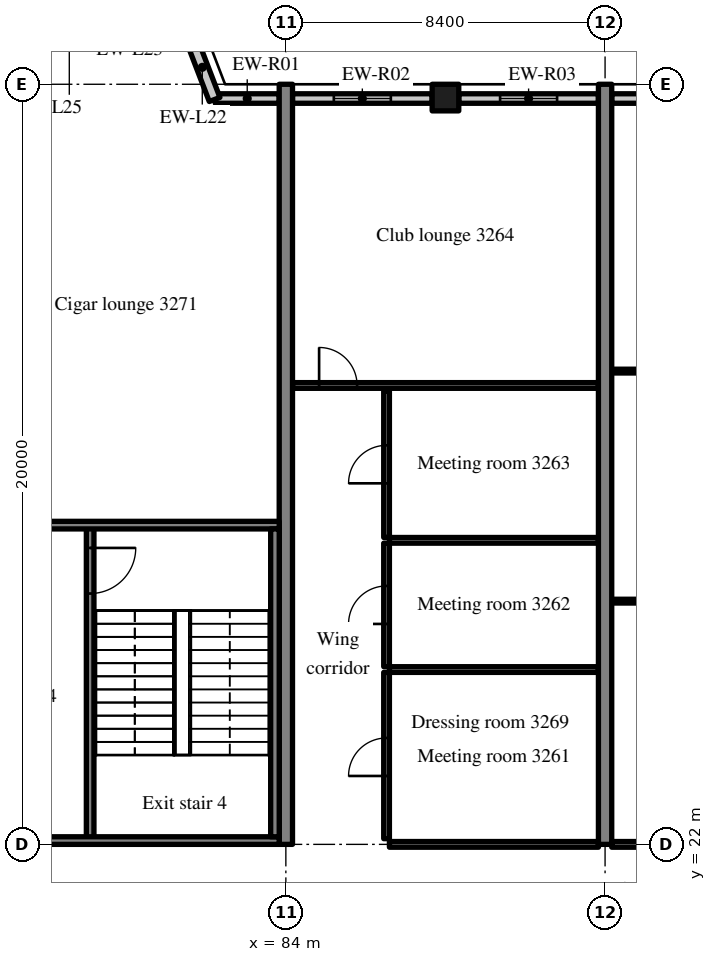
"""IFC4 building model, lengths in metres.
Left out: names, types, materials, properties, quantities, classifications, styles, units other than length and angle.
Written with IfcOpenShell. Run it as: python <this file> out.ifc"""

import sys

from ifc_helpers import new_model, si_unit, direction, frame, frame_2d, origin, origin_2d, place, context, subcontext, project, spatial, rectangle, extrude, source, transform, mapped, element, fill, save


model = new_model("IFC4")
c1 = context("Model", 3, precision=1e-05, world=origin(), true_north=direction((0.0, 1.0)))
c2 = subcontext(c1, "Body", "Model", "MODEL_VIEW")
j1 = project(units=[si_unit("LENGTHUNIT", "METRE"), si_unit("PLANEANGLEUNIT", "RADIAN")], contexts=[c1])
p1 = place(None, origin())
s1 = spatial("IfcSite", under=j1, at=p1, CompositionType="ELEMENT")
p2 = place(p1, origin())
s2 = spatial("IfcBuilding", under=s1, at=p2, CompositionType="ELEMENT")
p3 = place(p2, frame((0.0, 0.0, 133.2)))
s3 = spatial("IfcBuildingStorey", under=s2, at=p3, CompositionType="ELEMENT", Elevation=133.2)
m1 = source(origin(), c2, "Body", "SweptSolid", [
    extrude(rectangle(XDim=20.0, YDim=0.35, at=frame_2d((10.0, 0.0))), origin(), (0.0, 0.0, 1.0), 3.52),
])
for number, where, z_axis, x_axis in (
    (1, (84.0, 22.0, 0.0), (0.0, 0.0, 1.0), (0.0, 1.0, 0.0)),
    (2, (92.4, 22.0, 0.0), (0.0, 0.0, 1.0), (0.0, 1.0, 0.0)),
):
    element("IfcWall", number, at=place(p3, frame(where, z_axis=z_axis, x_axis=x_axis)), inside=s3, PredefinedType="SHEAR", context=c2, shape_type="MappedRepresentation", body=[
        mapped(m1, transform((0.0, 0.0, 0.0), scale=1.0)),
    ])
m2 = source(origin(), c2, "Body", "SweptSolid", [
    extrude(rectangle(XDim=0.7, YDim=0.7, at=origin_2d()), origin(), (0.0, 0.0, 1.0), 3.52),
])
p4 = place(p3, frame((88.2, 41.65, 0.0), z_axis=(0.0, 0.0, 1.0), x_axis=(1.0, 0.0, 0.0)))
e3 = element("IfcColumn", 3, at=p4, inside=s3, PredefinedType="COLUMN", context=c2, shape_type="MappedRepresentation", body=[
    mapped(m2, transform((0.0, 0.0, 0.0), scale=1.0)),
])
m3 = source(origin(), c2, "Body", "SweptSolid", [
    extrude(rectangle(XDim=1.683, YDim=0.25, at=frame_2d((0.841, 0.0))), origin(), (0.0, 0.0, 1.0), 2.82),
])
p5 = place(p3, frame((83.825, 41.625, 0.0), z_axis=(0.0, 0.0, 1.0), x_axis=(-1.0, 0.0, 0.0)))
e4 = element("IfcWall", 4, at=p5, inside=s3, PredefinedType="SOLIDWALL", context=c2, shape_type="MappedRepresentation", body=[
    mapped(m3, transform((0.0, 0.0, 0.0), scale=1.0)),
])
m4 = source(origin(), c2, "Body", "SweptSolid", [
    extrude(rectangle(XDim=3.675, YDim=0.25, at=frame_2d((1.837, 0.0))), origin(), (0.0, 0.0, 1.0), 2.82),
])
p6 = place(p3, frame((87.85, 41.625, 0.0), z_axis=(0.0, 0.0, 1.0), x_axis=(-1.0, 0.0, 0.0)))
e5 = element("IfcWall", 5, at=p6, inside=s3, PredefinedType="SOLIDWALL", context=c2, shape_type="MappedRepresentation", body=[
    mapped(m4, transform((0.0, 0.0, 0.0), scale=1.0)),
])
m5 = source(origin(), c2, "Body", "SweptSolid", [
    extrude(rectangle(XDim=1.5, YDim=1.5, at=frame_2d((0.75, 0.75))), frame((0.0, 0.135, 0.0), z_axis=(0.0, -1.0, 0.0), x_axis=(1.0, 0.0, 0.0)), (0.0, 0.0, 1.0), 0.27),
])
p7 = place(p6, frame((1.087, 0.0, 0.9)))
e6 = element("IfcOpeningElement", 6, at=p7, cuts=e5, PredefinedType="OPENING", context=c2, shape_type="MappedRepresentation", body=[
    mapped(m5, transform((0.0, 0.0, 0.0), scale=1.0)),
])
p8 = place(p3, frame((92.225, 41.625, 0.0), z_axis=(0.0, 0.0, 1.0), x_axis=(-1.0, 0.0, 0.0)))
e7 = element("IfcWall", 7, at=p8, inside=s3, PredefinedType="SOLIDWALL", context=c2, shape_type="MappedRepresentation", body=[
    mapped(m4, transform((0.0, 0.0, 0.0), scale=1.0)),
])
p9 = place(p8, frame((1.087, 0.0, 0.9)))
e8 = element("IfcOpeningElement", 8, at=p9, cuts=e7, PredefinedType="OPENING", context=c2, shape_type="MappedRepresentation", body=[
    mapped(m5, transform((0.0, 0.0, 0.0), scale=1.0)),
])
m6 = source(origin(), c2, "Body", "SweptSolid", [
    extrude(rectangle(XDim=4.07, YDim=0.25, at=frame_2d((2.035, 0.0))), origin(), (0.0, 0.0, 1.0), 2.82),
])
p10 = place(p3, frame((96.645, 41.625, 0.0), z_axis=(0.0, 0.0, 1.0), x_axis=(-1.0, 0.0, 0.0)))
e9 = element("IfcWall", 9, at=p10, inside=s3, PredefinedType="SOLIDWALL", context=c2, shape_type="MappedRepresentation", body=[
    mapped(m6, transform((0.0, 0.0, 0.0), scale=1.0)),
])
p11 = place(p10, frame((1.285, 0.0, 0.9)))
e10 = element("IfcOpeningElement", 10, at=p11, cuts=e9, PredefinedType="OPENING", context=c2, shape_type="MappedRepresentation", body=[
    mapped(m5, transform((0.0, 0.0, 0.0), scale=1.0)),
])
m7 = source(origin(), c2, "Body", "SweptSolid", [
    extrude(rectangle(XDim=1.812, YDim=0.3, at=frame_2d((0.906, 0.0))), origin(), (0.0, 0.0, 1.0), 3.52),
])
p12 = place(p3, frame((82.125, 41.6, 0.0), z_axis=(0.0, 0.0, 1.0), x_axis=(-0.357877270961, 0.93376863244, 0.0)))
e11 = element("IfcWall", 11, at=p12, inside=s3, PredefinedType="SOLIDWALL", context=c2, shape_type="MappedRepresentation", body=[
    mapped(m7, transform((0.0, 0.0, 0.0), scale=1.0)),
])
m8 = source(origin(), c2, "Body", "SweptSolid", [
    extrude(rectangle(XDim=8.3, YDim=0.2, at=frame_2d((4.15, 0.0))), origin(), (0.0, 0.0, 1.0), 3.52),
])
p13 = place(p3, frame((78.85, 22.1, 0.0), z_axis=(0.0, 0.0, 1.0), x_axis=(0.0, 1.0, 0.0)))
e12 = element("IfcWall", 12, at=p13, inside=s3, PredefinedType="SOLIDWALL", context=c2, shape_type="MappedRepresentation", body=[
    mapped(m8, transform((0.0, 0.0, 0.0), scale=1.0)),
])
m9 = source(origin(), c2, "Body", "SweptSolid", [
    extrude(rectangle(XDim=1.2, YDim=2.1, at=frame_2d((0.6, 1.05))), frame((0.0, 0.11, 0.0), z_axis=(0.0, -1.0, 0.0), x_axis=(1.0, 0.0, 0.0)), (0.0, 0.0, 1.0), 0.22),
])
p14 = place(p13, frame((6.5, 0.0, 0.0)))
e13 = element("IfcOpeningElement", 13, at=p14, cuts=e12, PredefinedType="OPENING", context=c2, shape_type="MappedRepresentation", body=[
    mapped(m9, transform((0.0, 0.0, 0.0), scale=1.0)),
])
m10 = source(origin(), c2, "Body", "SweptSolid", [
    extrude(rectangle(XDim=8.225, YDim=0.2, at=frame_2d((4.112, 0.0))), origin(), (0.0, 0.0, 1.0), 3.52),
])
p15 = place(p3, frame((83.825, 22.1, 0.0), z_axis=(0.0, 0.0, 1.0), x_axis=(-1.0, 0.0, 0.0)))
e14 = element("IfcWall", 14, at=p15, inside=s3, PredefinedType="SOLIDWALL", context=c2, shape_type="MappedRepresentation", body=[
    mapped(m10, transform((0.0, 0.0, 0.0), scale=1.0)),
])
p16 = place(p15, frame((6.025, 0.0, 0.0)))
e15 = element("IfcOpeningElement", 15, at=p16, cuts=e14, PredefinedType="OPENING", context=c2, shape_type="MappedRepresentation", body=[
    mapped(m9, transform((0.0, 0.0, 0.0), scale=1.0)),
])
p17 = place(p3, frame((83.825, 30.4, 0.0), z_axis=(0.0, 0.0, 1.0), x_axis=(-1.0, 0.0, 0.0)))
e16 = element("IfcWall", 16, at=p17, inside=s3, PredefinedType="SOLIDWALL", context=c2, shape_type="MappedRepresentation", body=[
    mapped(m10, transform((0.0, 0.0, 0.0), scale=1.0)),
])
m11 = source(origin(), c2, "Body", "SweptSolid", [
    extrude(rectangle(XDim=1.0, YDim=2.1, at=frame_2d((0.5, 1.05))), frame((0.0, 0.11, 0.0), z_axis=(0.0, -1.0, 0.0), x_axis=(1.0, 0.0, 0.0)), (0.0, 0.0, 1.0), 0.22),
])
p18 = place(p17, frame((6.125, 0.0, 0.0)))
e17 = element("IfcOpeningElement", 17, at=p18, cuts=e16, PredefinedType="OPENING", context=c2, shape_type="MappedRepresentation", body=[
    mapped(m11, transform((0.0, 0.0, 0.0), scale=1.0)),
])
m12 = source(origin(), c2, "Body", "SweptSolid", [
    extrude(rectangle(XDim=8.1, YDim=0.225, at=frame_2d((4.05, 0.0))), origin(), (0.0, 0.0, 1.0), 3.52),
])
p19 = place(p3, frame((83.713, 22.2, 0.0), z_axis=(0.0, 0.0, 1.0), x_axis=(0.0, 1.0, 0.0)))
e18 = element("IfcWall", 18, at=p19, inside=s3, PredefinedType="SOLIDWALL", context=c2, shape_type="MappedRepresentation", body=[
    mapped(m12, transform((0.0, 0.0, 0.0), scale=1.0)),
])
m13 = source(origin(), c2, "Body", "SweptSolid", [
    extrude(rectangle(XDim=5.5, YDim=0.15, at=frame_2d((2.75, 0.0))), origin(), (0.0, 0.0, 1.0), 2.82),
])
p20 = place(p3, frame((86.725, 22.0, 0.0), z_axis=(0.0, 0.0, 1.0), x_axis=(1.0, 0.0, 0.0)))
e19 = element("IfcWall", 19, at=p20, inside=s3, PredefinedType="PARTITIONING", context=c2, shape_type="MappedRepresentation", body=[
    mapped(m13, transform((0.0, 0.0, 0.0), scale=1.0)),
])
m14 = source(origin(), c2, "Body", "SweptSolid", [
    extrude(rectangle(XDim=4.375, YDim=0.15, at=frame_2d((2.188, 0.0))), origin(), (0.0, 0.0, 1.0), 3.52),
])
p21 = place(p3, frame((86.65, 22.15, 0.0), z_axis=(0.0, 0.0, 1.0), x_axis=(0.0, 1.0, 0.0)))
e20 = element("IfcWall", 20, at=p21, inside=s3, PredefinedType="PARTITIONING", context=c2, shape_type="MappedRepresentation", body=[
    mapped(m14, transform((0.0, 0.0, 0.0), scale=1.0)),
])
m15 = source(origin(), c2, "Body", "SweptSolid", [
    extrude(rectangle(XDim=1.0, YDim=2.1, at=frame_2d((0.5, 1.05))), frame((0.0, 0.085, 0.0), z_axis=(0.0, -1.0, 0.0), x_axis=(1.0, 0.0, 0.0)), (0.0, 0.0, 1.0), 0.17),
])
p22 = place(p21, frame((1.65, 0.0, 0.0)))
e21 = element("IfcOpeningElement", 21, at=p22, cuts=e20, PredefinedType="OPENING", context=c2, shape_type="MappedRepresentation", body=[
    mapped(m15, transform((0.0, 0.0, 0.0), scale=1.0)),
])
m16 = source(origin(), c2, "Body", "SweptSolid", [
    extrude(rectangle(XDim=5.5, YDim=0.15, at=frame_2d((2.75, 0.0))), origin(), (0.0, 0.0, 1.0), 3.52),
])
p23 = place(p3, frame((86.725, 26.6, 0.0), z_axis=(0.0, 0.0, 1.0), x_axis=(1.0, 0.0, 0.0)))
e22 = element("IfcWall", 22, at=p23, inside=s3, PredefinedType="PARTITIONING", context=c2, shape_type="MappedRepresentation", body=[
    mapped(m16, transform((0.0, 0.0, 0.0), scale=1.0)),
])
m17 = source(origin(), c2, "Body", "SweptSolid", [
    extrude(rectangle(XDim=3.25, YDim=0.15, at=frame_2d((1.625, 0.0))), origin(), (0.0, 0.0, 1.0), 3.52),
])
p24 = place(p3, frame((86.65, 26.675, 0.0), z_axis=(0.0, 0.0, 1.0), x_axis=(0.0, 1.0, 0.0)))
e23 = element("IfcWall", 23, at=p24, inside=s3, PredefinedType="PARTITIONING", context=c2, shape_type="MappedRepresentation", body=[
    mapped(m17, transform((0.0, 0.0, 0.0), scale=1.0)),
])
p25 = place(p24, frame((1.125, 0.0, 0.0)))
e24 = element("IfcOpeningElement", 24, at=p25, cuts=e23, PredefinedType="OPENING", context=c2, shape_type="MappedRepresentation", body=[
    mapped(m15, transform((0.0, 0.0, 0.0), scale=1.0)),
])
p26 = place(p3, frame((86.725, 30.0, 0.0), z_axis=(0.0, 0.0, 1.0), x_axis=(1.0, 0.0, 0.0)))
e25 = element("IfcWall", 25, at=p26, inside=s3, PredefinedType="PARTITIONING", context=c2, shape_type="MappedRepresentation", body=[
    mapped(m16, transform((0.0, 0.0, 0.0), scale=1.0)),
])
m18 = source(origin(), c2, "Body", "SweptSolid", [
    extrude(rectangle(XDim=3.85, YDim=0.15, at=frame_2d((1.925, 0.0))), origin(), (0.0, 0.0, 1.0), 3.52),
])
p27 = place(p3, frame((86.65, 30.075, 0.0), z_axis=(0.0, 0.0, 1.0), x_axis=(0.0, 1.0, 0.0)))
e26 = element("IfcWall", 26, at=p27, inside=s3, PredefinedType="PARTITIONING", context=c2, shape_type="MappedRepresentation", body=[
    mapped(m18, transform((0.0, 0.0, 0.0), scale=1.0)),
])
p28 = place(p27, frame((1.425, 0.0, 0.0)))
e27 = element("IfcOpeningElement", 27, at=p28, cuts=e26, PredefinedType="OPENING", context=c2, shape_type="MappedRepresentation", body=[
    mapped(m15, transform((0.0, 0.0, 0.0), scale=1.0)),
])
m19 = source(origin(), c2, "Body", "SweptSolid", [
    extrude(rectangle(XDim=8.05, YDim=0.15, at=frame_2d((4.025, 0.0))), origin(), (0.0, 0.0, 1.0), 3.52),
])
p29 = place(p3, frame((84.175, 34.075, 0.0), z_axis=(0.0, 0.0, 1.0), x_axis=(1.0, 0.0, 0.0)))
e28 = element("IfcWall", 28, at=p29, inside=s3, PredefinedType="PARTITIONING", context=c2, shape_type="MappedRepresentation", body=[
    mapped(m19, transform((0.0, 0.0, 0.0), scale=1.0)),
])
p30 = place(p29, frame((0.7, 0.0, 0.0)))
e29 = element("IfcOpeningElement", 29, at=p30, cuts=e28, PredefinedType="OPENING", context=c2, shape_type="MappedRepresentation", body=[
    mapped(m15, transform((0.0, 0.0, 0.0), scale=1.0)),
])
m20 = source(origin(), c2, "Body", "SweptSolid", [
    extrude(rectangle(XDim=2.425, YDim=0.1, at=frame_2d((1.212, 0.0))), origin(), (0.0, 0.0, 1.0), 3.52),
])
p31 = place(p3, frame((92.575, 28.4, 0.0), z_axis=(0.0, 0.0, 1.0), x_axis=(1.0, 0.0, 0.0)))
e30 = element("IfcWall", 30, at=p31, inside=s3, PredefinedType="PARTITIONING", context=c2, shape_type="MappedRepresentation", body=[
    mapped(m20, transform((0.0, 0.0, 0.0), scale=1.0)),
])
m21 = source(origin(), c2, "Body", "SweptSolid", [
    extrude(rectangle(XDim=0.9, YDim=2.1, at=frame_2d((0.45, 1.05))), frame((0.0, 0.06, 0.0), z_axis=(0.0, -1.0, 0.0), x_axis=(1.0, 0.0, 0.0)), (0.0, 0.0, 1.0), 0.12),
])
p32 = place(p31, frame((0.763, 0.0, 0.0)))
e31 = element("IfcOpeningElement", 31, at=p32, cuts=e30, PredefinedType="OPENING", context=c2, shape_type="MappedRepresentation", body=[
    mapped(m21, transform((0.0, 0.0, 0.0), scale=1.0)),
])
m22 = source(origin(), c2, "Body", "SweptSolid", [
    extrude(rectangle(XDim=7.875, YDim=0.1, at=frame_2d((3.938, 0.0))), origin(), (0.0, 0.0, 1.0), 3.52),
])
p33 = place(p3, frame((92.575, 34.453, 0.0), z_axis=(0.0, 0.0, 1.0), x_axis=(1.0, 0.0, 0.0)))
e32 = element("IfcWall", 32, at=p33, inside=s3, PredefinedType="PARTITIONING", context=c2, shape_type="MappedRepresentation", body=[
    mapped(m22, transform((0.0, 0.0, 0.0), scale=1.0)),
])
m23 = source(origin(), c2, "Body", "SweptSolid", [
    extrude(rectangle(XDim=1.8, YDim=2.1, at=frame_2d((0.9, 1.05))), frame((0.0, 0.06, 0.0), z_axis=(0.0, -1.0, 0.0), x_axis=(1.0, 0.0, 0.0)), (0.0, 0.0, 1.0), 0.12),
])
p34 = place(p33, frame((3.037, 0.0, 0.0)))
e33 = element("IfcOpeningElement", 33, at=p34, cuts=e32, PredefinedType="OPENING", context=c2, shape_type="MappedRepresentation", body=[
    mapped(m23, transform((0.0, 0.0, 0.0), scale=1.0)),
])
m24 = source(origin(), c2, "Body", "SweptSolid", [
    extrude(rectangle(XDim=7.875, YDim=0.15, at=frame_2d((3.938, 0.0))), origin(), (0.0, 0.0, 1.0), 2.82),
])
p35 = place(p3, frame((92.575, 22.0, 0.0), z_axis=(0.0, 0.0, 1.0), x_axis=(1.0, 0.0, 0.0)))
e34 = element("IfcWall", 34, at=p35, inside=s3, PredefinedType="PARTITIONING", context=c2, shape_type="MappedRepresentation", body=[
    mapped(m24, transform((0.0, 0.0, 0.0), scale=1.0)),
])
p36 = place(p35, frame((6.475, 0.0, 0.0)))
e35 = element("IfcOpeningElement", 35, at=p36, cuts=e34, PredefinedType="OPENING", context=c2, shape_type="MappedRepresentation", body=[
    mapped(m15, transform((0.0, 0.0, 0.0), scale=1.0)),
])
m25 = source(origin(), c2, "Body", "SweptSolid", [
    extrude(rectangle(XDim=1.5, YDim=1.5, at=frame_2d((0.75, 0.75))), frame((0.0, 0.03, 0.0), z_axis=(0.0, -1.0, 0.0), x_axis=(1.0, 0.0, 0.0)), (0.0, 0.0, 1.0), 0.06),
])
p37 = place(p7, origin())
e36 = element("IfcWindow", 36, at=p37, inside=s3, PartitioningType="SINGLE_PANEL", PredefinedType="WINDOW", context=c2, shape_type="MappedRepresentation", body=[
    mapped(m25, transform((0.0, 0.0, 0.0), scale=1.0)),
])
fill(e6, e36)
p38 = place(p9, origin())
e37 = element("IfcWindow", 37, at=p38, inside=s3, PartitioningType="SINGLE_PANEL", PredefinedType="WINDOW", context=c2, shape_type="MappedRepresentation", body=[
    mapped(m25, transform((0.0, 0.0, 0.0), scale=1.0)),
])
fill(e8, e37)
m26 = source(origin(), c2, "Body", "SweptSolid", [
    extrude(rectangle(XDim=1.2, YDim=2.1, at=frame_2d((0.6, 1.05))), frame((0.0, 0.025, 0.0), z_axis=(0.0, -1.0, 0.0), x_axis=(1.0, 0.0, 0.0)), (0.0, 0.0, 1.0), 0.05),
])
p39 = place(p14, origin())
e38 = element("IfcDoor", 38, at=p39, inside=s3, OperationType="SINGLE_SWING_RIGHT", PredefinedType="DOOR", context=c2, shape_type="MappedRepresentation", body=[
    mapped(m26, transform((0.0, 0.0, 0.0), scale=1.0)),
])
fill(e13, e38)
m27 = source(origin(), c2, "Body", "SweptSolid", [
    extrude(rectangle(XDim=1.0, YDim=2.1, at=frame_2d((0.5, 1.05))), frame((0.0, 0.025, 0.0), z_axis=(0.0, -1.0, 0.0), x_axis=(1.0, 0.0, 0.0)), (0.0, 0.0, 1.0), 0.05),
])
p40 = place(p22, origin())
e39 = element("IfcDoor", 39, at=p40, inside=s3, OperationType="SINGLE_SWING_LEFT", PredefinedType="DOOR", context=c2, shape_type="MappedRepresentation", body=[
    mapped(m27, transform((0.0, 0.0, 0.0), scale=1.0)),
])
fill(e21, e39)
p41 = place(p25, origin())
e40 = element("IfcDoor", 40, at=p41, inside=s3, OperationType="SINGLE_SWING_LEFT", PredefinedType="DOOR", context=c2, shape_type="MappedRepresentation", body=[
    mapped(m27, transform((0.0, 0.0, 0.0), scale=1.0)),
])
fill(e24, e40)
p42 = place(p28, origin())
e41 = element("IfcDoor", 41, at=p42, inside=s3, OperationType="SINGLE_SWING_LEFT", PredefinedType="DOOR", context=c2, shape_type="MappedRepresentation", body=[
    mapped(m27, transform((0.0, 0.0, 0.0), scale=1.0)),
])
fill(e27, e41)
p43 = place(p30, origin())
e42 = element("IfcDoor", 42, at=p43, inside=s3, OperationType="SINGLE_SWING_LEFT", PredefinedType="DOOR", context=c2, shape_type="MappedRepresentation", body=[
    mapped(m27, transform((0.0, 0.0, 0.0), scale=1.0)),
])
fill(e29, e42)
save(model, sys.argv[1])
